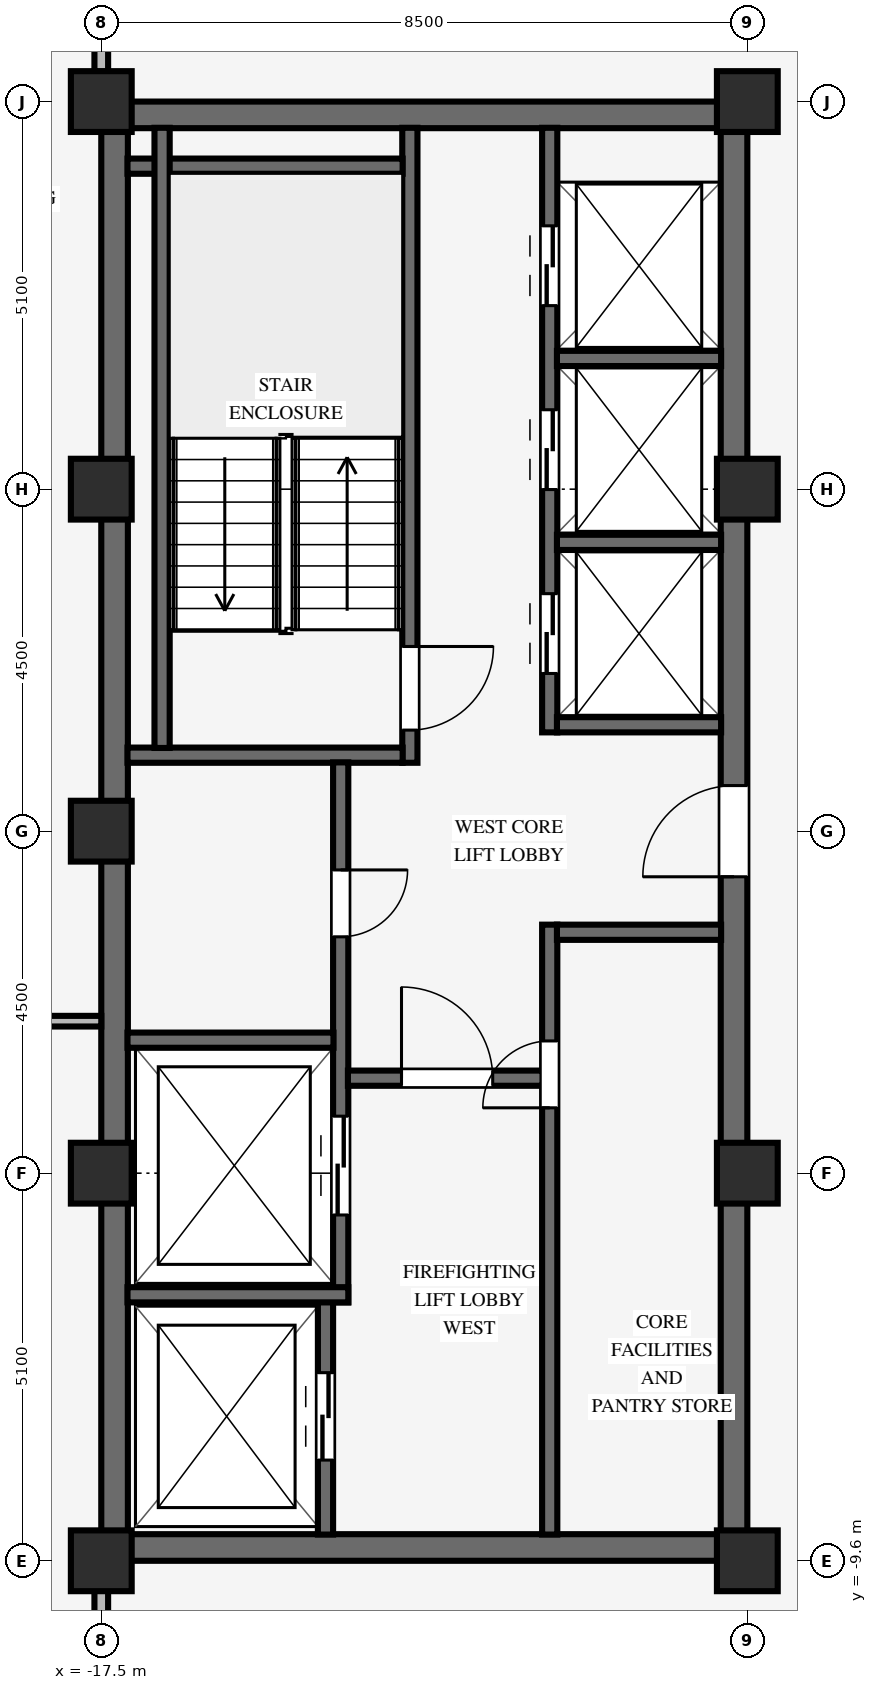
"""IFC4 building model, lengths in metres.
Left out: names, types, materials, properties, quantities, classifications, styles, units other than length and angle.
Written with IfcOpenShell. Run it as: python <this file> out.ifc"""

import sys

from ifc_helpers import new_model, si_unit, direction, frame, frame_2d, origin, origin_2d, place, context, subcontext, project, spatial, rectangle, extrude, source, transform, mapped, element, fill, save


model = new_model("IFC4")
c1 = context("Model", 3, precision=1e-05, world=origin(), true_north=direction((0.0, 1.0)))
c2 = subcontext(c1, "Body", "Model", "MODEL_VIEW")
j1 = project(units=[si_unit("LENGTHUNIT", "METRE"), si_unit("PLANEANGLEUNIT", "RADIAN")], contexts=[c1])
p1 = place(None, origin())
s1 = spatial("IfcSite", under=j1, at=p1, CompositionType="ELEMENT")
p2 = place(p1, origin())
s2 = spatial("IfcBuilding", under=s1, at=p2, CompositionType="ELEMENT")
p3 = place(p2, frame((0.0, 0.0, 249.3)))
s3 = spatial("IfcBuildingStorey", under=s2, at=p3, CompositionType="ELEMENT", Elevation=249.3)
for number, where, z_axis, x_axis in (
    (1, (-17.5, -9.425, 0.0), (0.0, 0.0, 1.0), (1.0, 0.0, 0.0)),
    (2, (-17.5, 9.425, 0.0), (0.0, 0.0, 1.0), (1.0, 0.0, 0.0)),
):
    element("IfcWall", number, at=place(p3, frame(where, z_axis=z_axis, x_axis=x_axis)), inside=s3, PredefinedType="SHEAR", context=c2, shape_type="SweptSolid", body=[
        extrude(rectangle(XDim=8.5, YDim=0.35, at=frame_2d((4.25, 0.0))), origin(), (0.0, 0.0, 1.0), 3.25),
    ])
p4 = place(p3, frame((-17.325, -9.255, 0.0), z_axis=(0.0, 0.0, 1.0), x_axis=(0.0, 1.0, 0.0)))
e3 = element("IfcWall", 3, at=p4, inside=s3, PredefinedType="SHEAR", context=c2, shape_type="SweptSolid", body=[
    extrude(rectangle(XDim=18.51, YDim=0.35, at=frame_2d((9.255, 0.0))), origin(), (0.0, 0.0, 1.0), 3.25),
])
p5 = place(p3, frame((-9.175, -9.255, 0.0), z_axis=(0.0, 0.0, 1.0), x_axis=(0.0, 1.0, 0.0)))
e4 = element("IfcWall", 4, at=p5, inside=s3, PredefinedType="SHEAR", context=c2, shape_type="SweptSolid", body=[
    extrude(rectangle(XDim=18.51, YDim=0.35, at=frame_2d((9.255, 0.0))), origin(), (0.0, 0.0, 1.0), 3.25),
])
p6 = place(p5, frame((8.655, 0.0, 0.0)))
e5 = element("IfcOpeningElement", 5, at=p6, cuts=e4, PredefinedType="OPENING", context=c2, shape_type="SweptSolid", body=[
    extrude(rectangle(XDim=1.2, YDim=2.15, at=frame_2d((0.6, 1.075))), frame((0.0, 0.185, 0.0), z_axis=(0.0, -1.0, 0.0), x_axis=(1.0, 0.0, 0.0)), (0.0, 0.0, 1.0), 0.37),
])
for number, where, z_axis, x_axis in (
    (6, (-17.5, -9.6, 0.0), (0.0, 0.0, 1.0), (1.0, 0.0, 0.0)),
    (7, (-17.5, -4.5, 0.0), (0.0, 0.0, 1.0), (1.0, 0.0, 0.0)),
    (8, (-17.5, 4.5, 0.0), (0.0, 0.0, 1.0), (1.0, 0.0, 0.0)),
    (9, (-17.5, 9.6, 0.0), (0.0, 0.0, 1.0), (1.0, 0.0, 0.0)),
    (10, (-9.0, -9.6, 0.0), (0.0, 0.0, 1.0), (1.0, 0.0, 0.0)),
    (11, (-9.0, -4.5, 0.0), (0.0, 0.0, 1.0), (1.0, 0.0, 0.0)),
    (12, (-9.0, 4.5, 0.0), (0.0, 0.0, 1.0), (1.0, 0.0, 0.0)),
    (13, (-9.0, 9.6, 0.0), (0.0, 0.0, 1.0), (1.0, 0.0, 0.0)),
    (14, (-17.5, 0.0, 0.0), (0.0, 0.0, 1.0), (1.0, 0.0, 0.0)),
):
    element("IfcColumn", number, at=place(p3, frame(where, z_axis=z_axis, x_axis=x_axis)), inside=s3, PredefinedType="COLUMN", context=c2, shape_type="SweptSolid", body=[
        extrude(rectangle(XDim=0.8, YDim=0.8, at=origin_2d()), origin(), (0.0, 0.0, 1.0), 3.25),
    ])
p7 = place(p3, frame((-13.44, 0.9, 0.0), z_axis=(0.0, 0.0, 1.0), x_axis=(0.0, 1.0, 0.0)))
e15 = element("IfcWall", 15, at=p7, inside=s3, PredefinedType="SHEAR", context=c2, shape_type="SweptSolid", body=[
    extrude(rectangle(XDim=8.355, YDim=0.2, at=frame_2d((4.177, 0.0))), origin(), (0.0, 0.0, 1.0), 3.25),
])
p8 = place(p7, frame((1.53, 0.0, 0.0), z_axis=(0.0, 0.0, 1.0), x_axis=(-1.0, 0.0, 0.0)))
e16 = element("IfcOpeningElement", 16, at=p8, cuts=e15, PredefinedType="OPENING", context=c2, shape_type="SweptSolid", body=[
    extrude(rectangle(XDim=1.1, YDim=2.15, at=frame_2d((0.55, 1.075))), frame((0.0, 0.11, 0.0), z_axis=(0.0, -1.0, 0.0), x_axis=(1.0, 0.0, 0.0)), (0.0, 0.0, 1.0), 0.22),
])
for number, where, z_axis, x_axis in (
    (17, (-17.155, 1.0, 0.0), (0.0, 0.0, 1.0), (1.0, 0.0, 0.0)),
    (18, (-17.155, 8.75, 0.0), (0.0, 0.0, 1.0), (1.0, 0.0, 0.0)),
):
    element("IfcWall", number, at=place(p3, frame(where, z_axis=z_axis, x_axis=x_axis)), inside=s3, PredefinedType="SHEAR", context=c2, shape_type="SweptSolid", body=[
        extrude(rectangle(XDim=3.62, YDim=0.2, at=frame_2d((1.81, 0.0))), origin(), (0.0, 0.0, 1.0), 3.25),
    ])
p9 = place(p3, frame((-16.7, 1.095, 0.0), z_axis=(0.0, 0.0, 1.0), x_axis=(0.0, 1.0, 0.0)))
e19 = element("IfcWall", 19, at=p9, inside=s3, PredefinedType="SHEAR", context=c2, shape_type="SweptSolid", body=[
    extrude(rectangle(XDim=8.16, YDim=0.2, at=frame_2d((4.08, 0.0))), origin(), (0.0, 0.0, 1.0), 3.25),
])
p10 = place(p3, frame((-14.55, -9.255, 0.0), z_axis=(0.0, 0.0, 1.0), x_axis=(0.0, 1.0, 0.0)))
e20 = element("IfcWall", 20, at=p10, inside=s3, PredefinedType="SHEAR", context=c2, shape_type="SweptSolid", body=[
    extrude(rectangle(XDim=3.06, YDim=0.2, at=frame_2d((1.53, 0.0))), origin(), (0.0, 0.0, 1.0), 3.25),
])
p11 = place(p10, frame((0.98, 0.0, 0.0)))
e21 = element("IfcOpeningElement", 21, at=p11, cuts=e20, PredefinedType="OPENING", context=c2, shape_type="SweptSolid", body=[
    extrude(rectangle(XDim=1.15, YDim=2.15, at=frame_2d((0.575, 1.075))), frame((0.0, 0.11, 0.0), z_axis=(0.0, -1.0, 0.0), x_axis=(1.0, 0.0, 0.0)), (0.0, 0.0, 1.0), 0.22),
])
p12 = place(p3, frame((-14.35, -6.2, 0.0), z_axis=(0.0, 0.0, 1.0), x_axis=(0.0, 1.0, 0.0)))
e22 = element("IfcWall", 22, at=p12, inside=s3, PredefinedType="SHEAR", context=c2, shape_type="SweptSolid", body=[
    extrude(rectangle(XDim=7.105, YDim=0.2, at=frame_2d((3.552, 0.0))), origin(), (0.0, 0.0, 1.0), 3.25),
])
p13 = place(p12, frame((5.69, 0.0, 0.0), z_axis=(0.0, 0.0, 1.0), x_axis=(-1.0, 0.0, 0.0)))
e23 = element("IfcOpeningElement", 23, at=p13, cuts=e22, PredefinedType="OPENING", context=c2, shape_type="SweptSolid", body=[
    extrude(rectangle(XDim=0.88, YDim=2.1, at=frame_2d((0.44, 1.05))), frame((0.0, 0.11, 0.0), z_axis=(0.0, -1.0, 0.0), x_axis=(1.0, 0.0, 0.0)), (0.0, 0.0, 1.0), 0.22),
])
p14 = place(p12, frame((1.15, 0.0, 0.0)))
e24 = element("IfcOpeningElement", 24, at=p14, cuts=e22, PredefinedType="OPENING", context=c2, shape_type="SweptSolid", body=[
    extrude(rectangle(XDim=1.3, YDim=2.2, at=frame_2d((0.65, 1.1))), frame((0.0, 0.11, 0.0), z_axis=(0.0, -1.0, 0.0), x_axis=(1.0, 0.0, 0.0)), (0.0, 0.0, 1.0), 0.22),
])
p15 = place(p3, frame((-17.155, -6.1, 0.0), z_axis=(0.0, 0.0, 1.0), x_axis=(1.0, 0.0, 0.0)))
e25 = element("IfcWall", 25, at=p15, inside=s3, PredefinedType="SHEAR", context=c2, shape_type="SweptSolid", body=[
    extrude(rectangle(XDim=2.905, YDim=0.2, at=frame_2d((1.453, 0.0))), origin(), (0.0, 0.0, 1.0), 3.25),
])
p16 = place(p3, frame((-17.155, -2.75, 0.0), z_axis=(0.0, 0.0, 1.0), x_axis=(1.0, 0.0, 0.0)))
e26 = element("IfcWall", 26, at=p16, inside=s3, PredefinedType="SHEAR", context=c2, shape_type="SweptSolid", body=[
    extrude(rectangle(XDim=2.71, YDim=0.2, at=frame_2d((1.355, 0.0))), origin(), (0.0, 0.0, 1.0), 3.25),
])
p17 = place(p3, frame((-11.6, -9.255, 0.0), z_axis=(0.0, 0.0, 1.0), x_axis=(0.0, 1.0, 0.0)))
e27 = element("IfcWall", 27, at=p17, inside=s3, PredefinedType="SHEAR", context=c2, shape_type="SweptSolid", body=[
    extrude(rectangle(XDim=8.025, YDim=0.2, at=frame_2d((4.012, 0.0))), origin(), (0.0, 0.0, 1.0), 3.25),
])
p18 = place(p17, frame((5.615, 0.0, 0.0)))
e28 = element("IfcOpeningElement", 28, at=p18, cuts=e27, PredefinedType="OPENING", context=c2, shape_type="SweptSolid", body=[
    extrude(rectangle(XDim=0.88, YDim=2.1, at=frame_2d((0.44, 1.05))), frame((0.0, 0.11, 0.0), z_axis=(0.0, -1.0, 0.0), x_axis=(1.0, 0.0, 0.0)), (0.0, 0.0, 1.0), 0.22),
])
p19 = place(p3, frame((-14.255, -3.25, 0.0), z_axis=(0.0, 0.0, 1.0), x_axis=(1.0, 0.0, 0.0)))
e29 = element("IfcWall", 29, at=p19, inside=s3, PredefinedType="SHEAR", context=c2, shape_type="SweptSolid", body=[
    extrude(rectangle(XDim=2.56, YDim=0.2, at=frame_2d((1.28, 0.0))), origin(), (0.0, 0.0, 1.0), 3.25),
])
p20 = place(p19, frame((0.705, 0.0, 0.0)))
e30 = element("IfcOpeningElement", 30, at=p20, cuts=e29, PredefinedType="OPENING", context=c2, shape_type="SweptSolid", body=[
    extrude(rectangle(XDim=1.2, YDim=2.15, at=frame_2d((0.6, 1.075))), frame((0.0, 0.11, 0.0), z_axis=(0.0, -1.0, 0.0), x_axis=(1.0, 0.0, 0.0)), (0.0, 0.0, 1.0), 0.22),
])
p21 = place(p3, frame((-11.505, -1.33, 0.0), z_axis=(0.0, 0.0, 1.0), x_axis=(1.0, 0.0, 0.0)))
e31 = element("IfcWall", 31, at=p21, inside=s3, PredefinedType="SHEAR", context=c2, shape_type="SweptSolid", body=[
    extrude(rectangle(XDim=2.16, YDim=0.2, at=frame_2d((1.08, 0.0))), origin(), (0.0, 0.0, 1.0), 3.25),
])
p22 = place(p3, frame((-11.6, 1.3, 0.0), z_axis=(0.0, 0.0, 1.0), x_axis=(0.0, 1.0, 0.0)))
e32 = element("IfcWall", 32, at=p22, inside=s3, PredefinedType="SHEAR", context=c2, shape_type="SweptSolid", body=[
    extrude(rectangle(XDim=7.955, YDim=0.2, at=frame_2d((3.978, 0.0))), origin(), (0.0, 0.0, 1.0), 3.25),
])
p23 = place(p22, frame((0.775, 0.0, 0.0)))
e33 = element("IfcOpeningElement", 33, at=p23, cuts=e32, PredefinedType="OPENING", context=c2, shape_type="SweptSolid", body=[
    extrude(rectangle(XDim=1.05, YDim=2.15, at=frame_2d((0.525, 1.075))), frame((0.0, 0.11, 0.0), z_axis=(0.0, -1.0, 0.0), x_axis=(1.0, 0.0, 0.0)), (0.0, 0.0, 1.0), 0.22),
])
p24 = place(p22, frame((3.195, 0.0, 0.0)))
e34 = element("IfcOpeningElement", 34, at=p24, cuts=e32, PredefinedType="OPENING", context=c2, shape_type="SweptSolid", body=[
    extrude(rectangle(XDim=1.05, YDim=2.15, at=frame_2d((0.525, 1.075))), frame((0.0, 0.11, 0.0), z_axis=(0.0, -1.0, 0.0), x_axis=(1.0, 0.0, 0.0)), (0.0, 0.0, 1.0), 0.22),
])
p25 = place(p22, frame((5.615, 0.0, 0.0)))
e35 = element("IfcOpeningElement", 35, at=p25, cuts=e32, PredefinedType="OPENING", context=c2, shape_type="SweptSolid", body=[
    extrude(rectangle(XDim=1.05, YDim=2.15, at=frame_2d((0.525, 1.075))), frame((0.0, 0.11, 0.0), z_axis=(0.0, -1.0, 0.0), x_axis=(1.0, 0.0, 0.0)), (0.0, 0.0, 1.0), 0.22),
])
for number, where, z_axis, x_axis in (
    (36, (-11.505, 1.4, 0.0), (0.0, 0.0, 1.0), (1.0, 0.0, 0.0)),
    (37, (-11.505, 3.8, 0.0), (0.0, 0.0, 1.0), (1.0, 0.0, 0.0)),
    (38, (-11.505, 6.22, 0.0), (0.0, 0.0, 1.0), (1.0, 0.0, 0.0)),
):
    element("IfcWall", number, at=place(p3, frame(where, z_axis=z_axis, x_axis=x_axis)), inside=s3, PredefinedType="SHEAR", context=c2, shape_type="SweptSolid", body=[
        extrude(rectangle(XDim=2.16, YDim=0.2, at=frame_2d((1.08, 0.0))), origin(), (0.0, 0.0, 1.0), 3.25),
    ])
p26 = place(p3, frame((-20.835, -2.5, 0.0), z_axis=(0.0, 0.0, 1.0), x_axis=(1.0, 0.0, 0.0)))
e39 = element("IfcWall", 39, at=p26, inside=s3, PredefinedType="PARTITIONING", context=c2, shape_type="SweptSolid", body=[
    extrude(rectangle(XDim=3.335, YDim=0.14, at=frame_2d((1.667, 0.0))), origin(), (0.0, 0.0, 1.0), 3.24),
])
for number, where, z_axis, x_axis in (
    (40, (-17.5, -11.114, 0.0), (0.0, 0.0, 1.0), (0.0, 1.0, 0.0)),
    (41, (-17.5, 9.996, 0.0), (0.0, 0.0, 1.0), (0.0, 1.0, 0.0)),
):
    element("IfcWall", number, at=place(p3, frame(where, z_axis=z_axis, x_axis=x_axis)), inside=s3, PredefinedType="PARTITIONING", context=c2, shape_type="SweptSolid", body=[
        extrude(rectangle(XDim=1.118, YDim=0.18, at=frame_2d((0.559, 0.0))), origin(), (0.0, 0.0, 1.0), 2.335),
    ])
m1 = source(origin(), c2, "Body", "SweptSolid", [
    extrude(rectangle(XDim=1.1, YDim=2.15, at=frame_2d((0.55, 1.075))), frame((0.0, 0.025, 0.0), z_axis=(0.0, -1.0, 0.0), x_axis=(1.0, 0.0, 0.0)), (0.0, 0.0, 1.0), 0.05),
])
p27 = place(p8, origin())
e42 = element("IfcDoor", 42, at=p27, inside=s3, OperationType="SINGLE_SWING_LEFT", PredefinedType="DOOR", context=c2, shape_type="MappedRepresentation", body=[
    mapped(m1, transform((0.0, 0.0, 0.0), scale=1.0)),
])
fill(e16, e42)
m2 = source(origin(), c2, "Body", "SweptSolid", [
    extrude(rectangle(XDim=0.88, YDim=2.1, at=frame_2d((0.44, 1.05))), frame((0.0, 0.025, 0.0), z_axis=(0.0, -1.0, 0.0), x_axis=(1.0, 0.0, 0.0)), (0.0, 0.0, 1.0), 0.05),
])
p28 = place(p13, origin())
e43 = element("IfcDoor", 43, at=p28, inside=s3, OperationType="SINGLE_SWING_LEFT", PredefinedType="DOOR", context=c2, shape_type="MappedRepresentation", body=[
    mapped(m2, transform((0.0, 0.0, 0.0), scale=1.0)),
])
fill(e23, e43)
m3 = source(origin(), c2, "Body", "SweptSolid", [
    extrude(rectangle(XDim=1.2, YDim=2.15, at=frame_2d((0.6, 1.075))), frame((0.0, 0.025, 0.0), z_axis=(0.0, -1.0, 0.0), x_axis=(1.0, 0.0, 0.0)), (0.0, 0.0, 1.0), 0.05),
])
p29 = place(p20, origin())
e44 = element("IfcDoor", 44, at=p29, inside=s3, OperationType="SINGLE_SWING_LEFT", PredefinedType="DOOR", context=c2, shape_type="MappedRepresentation", body=[
    mapped(m3, transform((0.0, 0.0, 0.0), scale=1.0)),
])
fill(e30, e44)
p30 = place(p18, origin())
e45 = element("IfcDoor", 45, at=p30, inside=s3, OperationType="SINGLE_SWING_LEFT", PredefinedType="DOOR", context=c2, shape_type="MappedRepresentation", body=[
    mapped(m2, transform((0.0, 0.0, 0.0), scale=1.0)),
])
fill(e28, e45)
p31 = place(p6, origin())
e46 = element("IfcDoor", 46, at=p31, inside=s3, OperationType="SINGLE_SWING_LEFT", PredefinedType="DOOR", context=c2, shape_type="MappedRepresentation", body=[
    mapped(m3, transform((0.0, 0.0, 0.0), scale=1.0)),
])
fill(e5, e46)
m4 = source(origin(), c2, "Body", "SweptSolid", [
    extrude(rectangle(XDim=1.15, YDim=2.15, at=frame_2d((0.575, 1.075))), frame((0.0, 0.025, 0.0), z_axis=(0.0, -1.0, 0.0), x_axis=(1.0, 0.0, 0.0)), (0.0, 0.0, 1.0), 0.05),
])
p32 = place(p11, origin())
e47 = element("IfcDoor", 47, at=p32, inside=s3, OperationType="DOUBLE_DOOR_SLIDING", PredefinedType="DOOR", context=c2, shape_type="MappedRepresentation", body=[
    mapped(m4, transform((0.0, 0.0, 0.0), scale=1.0)),
])
fill(e21, e47)
m5 = source(origin(), c2, "Body", "SweptSolid", [
    extrude(rectangle(XDim=1.3, YDim=2.2, at=frame_2d((0.65, 1.1))), frame((0.0, 0.025, 0.0), z_axis=(0.0, -1.0, 0.0), x_axis=(1.0, 0.0, 0.0)), (0.0, 0.0, 1.0), 0.05),
])
p33 = place(p14, origin())
e48 = element("IfcDoor", 48, at=p33, inside=s3, OperationType="DOUBLE_DOOR_SLIDING", PredefinedType="DOOR", context=c2, shape_type="MappedRepresentation", body=[
    mapped(m5, transform((0.0, 0.0, 0.0), scale=1.0)),
])
fill(e24, e48)
m6 = source(origin(), c2, "Body", "SweptSolid", [
    extrude(rectangle(XDim=1.05, YDim=2.15, at=frame_2d((0.525, 1.075))), frame((0.0, 0.025, 0.0), z_axis=(0.0, -1.0, 0.0), x_axis=(1.0, 0.0, 0.0)), (0.0, 0.0, 1.0), 0.05),
])
p34 = place(p23, origin())
e49 = element("IfcDoor", 49, at=p34, inside=s3, OperationType="DOUBLE_DOOR_SLIDING", PredefinedType="DOOR", context=c2, shape_type="MappedRepresentation", body=[
    mapped(m6, transform((0.0, 0.0, 0.0), scale=1.0)),
])
fill(e33, e49)
p35 = place(p24, origin())
e50 = element("IfcDoor", 50, at=p35, inside=s3, OperationType="DOUBLE_DOOR_SLIDING", PredefinedType="DOOR", context=c2, shape_type="MappedRepresentation", body=[
    mapped(m6, transform((0.0, 0.0, 0.0), scale=1.0)),
])
fill(e34, e50)
p36 = place(p25, origin())
e51 = element("IfcDoor", 51, at=p36, inside=s3, OperationType="DOUBLE_DOOR_SLIDING", PredefinedType="DOOR", context=c2, shape_type="MappedRepresentation", body=[
    mapped(m6, transform((0.0, 0.0, 0.0), scale=1.0)),
])
fill(e35, e51)
save(model, sys.argv[1])
